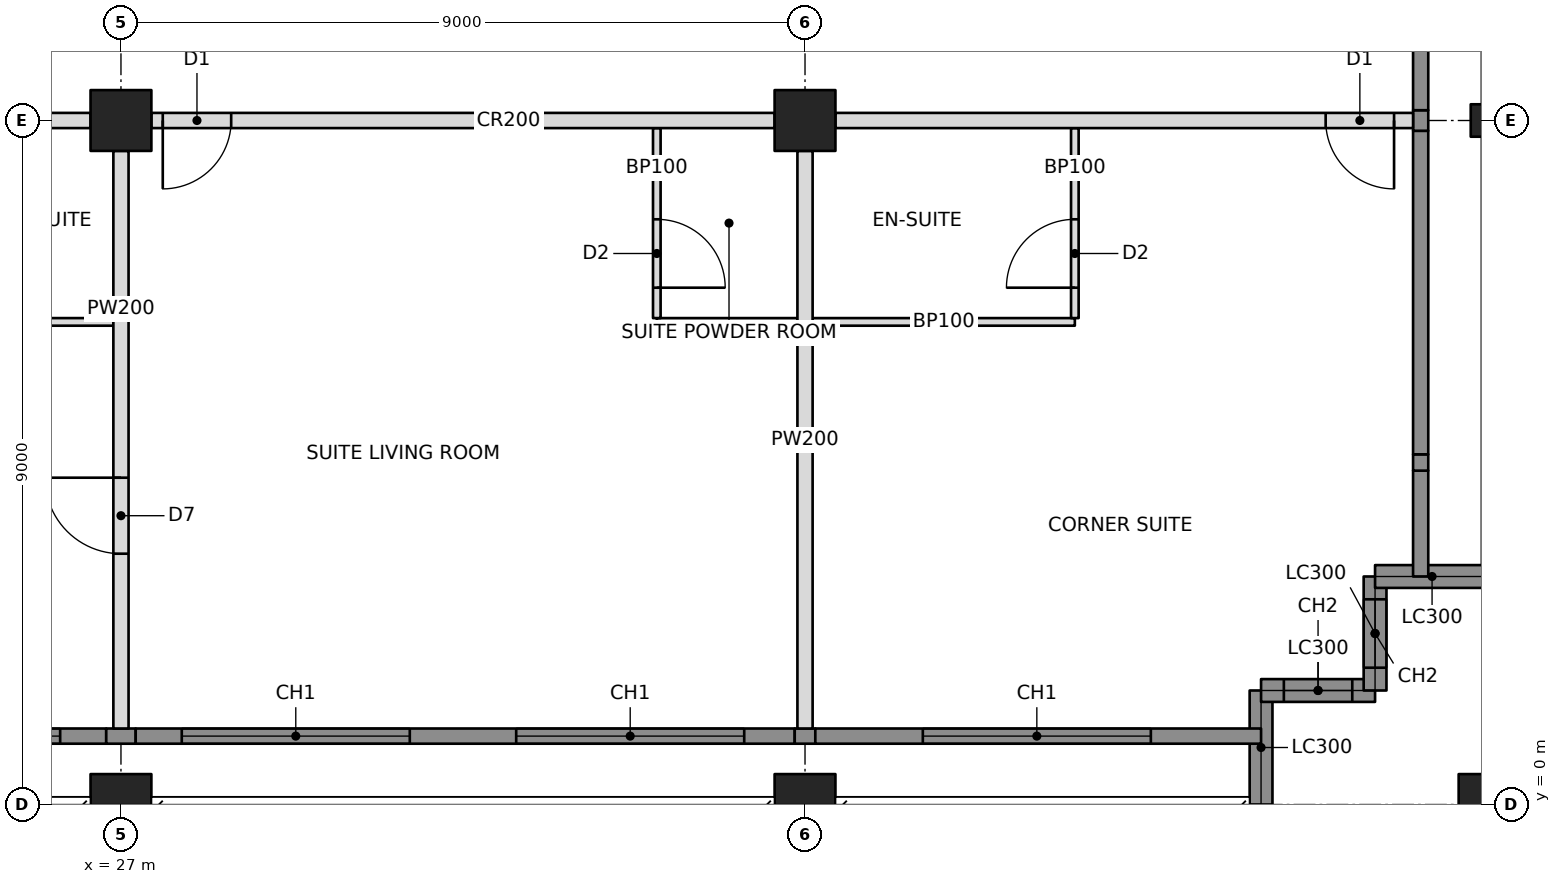
"""IFC4 building model, lengths in metres.
Left out: names, types, materials, properties, quantities, classifications, styles, units other than length and angle.
Written with IfcOpenShell. Run it as: python <this file> out.ifc"""

import sys

from ifc_helpers import new_model, si_unit, direction, frame, frame_2d, origin, origin_2d, place, context, subcontext, project, spatial, rectangle, hollow_rectangle, i_section, extrude, element, fill, save


model = new_model("IFC4")
c1 = context("Model", 3, precision=1e-05, world=origin(), true_north=direction((0.0, 1.0)))
c2 = subcontext(c1, "Body", "Model", "MODEL_VIEW")
j1 = project(units=[si_unit("LENGTHUNIT", "METRE"), si_unit("PLANEANGLEUNIT", "RADIAN")], contexts=[c1])
p1 = place(None, origin())
s1 = spatial("IfcSite", under=j1, at=p1, CompositionType="ELEMENT")
p2 = place(p1, origin())
s2 = spatial("IfcBuilding", under=s1, at=p2, CompositionType="ELEMENT")
p3 = place(p2, frame((0.0, 0.0, 214.8)))
s3 = spatial("IfcBuildingStorey", under=s2, at=p3, CompositionType="ELEMENT", Elevation=214.8)
p4 = place(p3, frame((27.0, 0.0, 0.0), z_axis=(0.0, 0.0, 1.0), x_axis=(1.0, 0.0, 0.0)))
e1 = element("IfcColumn", 1, at=p4, inside=s3, PredefinedType="COLUMN", context=c2, shape_type="SweptSolid", body=[
    extrude(hollow_rectangle(XDim=0.8, YDim=0.8, WallThickness=0.06, at=origin_2d()), origin(), (0.0, 0.0, 1.0), 3.4),
])
p5 = place(p3, frame((27.0, 9.0, 0.0), z_axis=(0.0, 0.0, 1.0), x_axis=(1.0, 0.0, 0.0)))
e2 = element("IfcColumn", 2, at=p5, inside=s3, PredefinedType="COLUMN", context=c2, shape_type="SweptSolid", body=[
    extrude(hollow_rectangle(XDim=0.8, YDim=0.8, WallThickness=0.05, at=origin_2d()), origin(), (0.0, 0.0, 1.0), 3.4),
])
p6 = place(p3, frame((36.0, 0.0, 0.0), z_axis=(0.0, 0.0, 1.0), x_axis=(1.0, 0.0, 0.0)))
e3 = element("IfcColumn", 3, at=p6, inside=s3, PredefinedType="COLUMN", context=c2, shape_type="SweptSolid", body=[
    extrude(hollow_rectangle(XDim=0.8, YDim=0.8, WallThickness=0.06, at=origin_2d()), origin(), (0.0, 0.0, 1.0), 3.4),
])
p7 = place(p3, frame((36.0, 9.0, 0.0), z_axis=(0.0, 0.0, 1.0), x_axis=(0.0, 1.0, 0.0)))
e4 = element("IfcColumn", 4, at=p7, inside=s3, PredefinedType="COLUMN", context=c2, shape_type="SweptSolid", body=[
    extrude(hollow_rectangle(XDim=0.8, YDim=0.8, WallThickness=0.05, at=origin_2d()), origin(), (0.0, 0.0, 1.0), 3.4),
])
p8 = place(p3, frame((45.0, 0.0, 0.0), z_axis=(0.0, 0.0, 1.0), x_axis=(1.0, 0.0, 0.0)))
e5 = element("IfcColumn", 5, at=p8, inside=s3, PredefinedType="COLUMN", context=c2, shape_type="SweptSolid", body=[
    extrude(hollow_rectangle(XDim=0.8, YDim=0.8, WallThickness=0.06, at=origin_2d()), origin(), (0.0, 0.0, 1.0), 3.4),
])
p9 = place(p3, frame((45.0, 9.0, 0.0), z_axis=(0.0, 0.0, 1.0), x_axis=(0.0, 1.0, 0.0)))
e6 = element("IfcColumn", 6, at=p9, inside=s3, PredefinedType="COLUMN", context=c2, shape_type="SweptSolid", body=[
    extrude(i_section(OverallWidth=0.427, OverallDepth=0.483, WebThickness=0.051, FlangeThickness=0.082, at=origin_2d()), origin(), (0.0, 0.0, 1.0), 3.4),
])
p10 = place(p3, frame((42.0, 0.0, 0.0), z_axis=(0.0, 0.0, 1.0), x_axis=(0.0, 1.0, 0.0)))
e7 = element("IfcWall", 7, at=p10, inside=s3, PredefinedType="SOLIDWALL", context=c2, shape_type="SweptSolid", body=[
    extrude(rectangle(XDim=1.5, YDim=0.3, at=frame_2d((0.75, 0.0))), origin(), (0.0, 0.0, 1.0), 2.42),
])
p11 = place(p3, frame((42.0, 1.5, 0.0), z_axis=(0.0, 0.0, 1.0), x_axis=(1.0, 0.0, 0.0)))
e8 = element("IfcWall", 8, at=p11, inside=s3, PredefinedType="SOLIDWALL", context=c2, shape_type="SweptSolid", body=[
    extrude(rectangle(XDim=1.5, YDim=0.3, at=frame_2d((0.75, 0.0))), origin(), (0.0, 0.0, 1.0), 3.2),
])
p12 = place(p11, frame((0.3, 0.0, 0.6)))
e9 = element("IfcOpeningElement", 9, at=p12, cuts=e8, PredefinedType="OPENING", context=c2, shape_type="SweptSolid", body=[
    extrude(rectangle(XDim=0.9, YDim=2.2, at=frame_2d((0.45, 1.1))), frame((0.0, 0.16, 0.0), z_axis=(0.0, -1.0, 0.0), x_axis=(1.0, 0.0, 0.0)), (0.0, 0.0, 1.0), 0.32),
])
p13 = place(p3, frame((43.5, 1.5, 0.0), z_axis=(0.0, 0.0, 1.0), x_axis=(0.0, 1.0, 0.0)))
e10 = element("IfcWall", 10, at=p13, inside=s3, PredefinedType="SOLIDWALL", context=c2, shape_type="SweptSolid", body=[
    extrude(rectangle(XDim=1.5, YDim=0.3, at=frame_2d((0.75, 0.0))), origin(), (0.0, 0.0, 1.0), 3.2),
])
p14 = place(p13, frame((0.3, 0.0, 0.6)))
e11 = element("IfcOpeningElement", 11, at=p14, cuts=e10, PredefinedType="OPENING", context=c2, shape_type="SweptSolid", body=[
    extrude(rectangle(XDim=0.9, YDim=2.2, at=frame_2d((0.45, 1.1))), frame((0.0, 0.16, 0.0), z_axis=(0.0, -1.0, 0.0), x_axis=(1.0, 0.0, 0.0)), (0.0, 0.0, 1.0), 0.32),
])
p15 = place(p3, frame((43.5, 3.0, 0.0), z_axis=(0.0, 0.0, 1.0), x_axis=(1.0, 0.0, 0.0)))
e12 = element("IfcWall", 12, at=p15, inside=s3, PredefinedType="SOLIDWALL", context=c2, shape_type="SweptSolid", body=[
    extrude(rectangle(XDim=1.5, YDim=0.3, at=frame_2d((0.75, 0.0))), origin(), (0.0, 0.0, 1.0), 2.42),
])
p16 = place(p3, frame((44.1, 3.0, 0.0), z_axis=(0.0, 0.0, 1.0), x_axis=(0.0, 1.0, 0.0)))
e13 = element("IfcWall", 13, at=p16, inside=s3, PredefinedType="SOLIDWALL", context=c2, shape_type="SweptSolid", body=[
    extrude(rectangle(XDim=1.393, YDim=0.2, at=frame_2d((0.696, 0.0))), origin(), (0.0, 0.0, 1.0), 3.2),
])
p17 = place(p3, frame((18.4, 9.0, 0.0), z_axis=(0.0, 0.0, 1.0), x_axis=(1.0, 0.0, 0.0)))
e14 = element("IfcWall", 14, at=p17, inside=s3, PredefinedType="PARTITIONING", context=c2, shape_type="SweptSolid", body=[
    extrude(rectangle(XDim=8.2, YDim=0.2, at=frame_2d((4.1, 0.0))), origin(), (0.0, 0.0, 1.0), 2.405),
])
p18 = place(p17, frame((2.95, 0.0, 0.0)))
e15 = element("IfcOpeningElement", 15, at=p18, cuts=e14, PredefinedType="OPENING", context=c2, shape_type="SweptSolid", body=[
    extrude(rectangle(XDim=0.9, YDim=2.1, at=frame_2d((0.45, 1.05))), frame((0.0, 0.11, 0.0), z_axis=(0.0, -1.0, 0.0), x_axis=(1.0, 0.0, 0.0)), (0.0, 0.0, 1.0), 0.22),
])
p19 = place(p17, frame((4.35, 0.0, 0.0)))
e16 = element("IfcOpeningElement", 16, at=p19, cuts=e14, PredefinedType="OPENING", context=c2, shape_type="SweptSolid", body=[
    extrude(rectangle(XDim=0.9, YDim=2.1, at=frame_2d((0.45, 1.05))), frame((0.0, 0.11, 0.0), z_axis=(0.0, -1.0, 0.0), x_axis=(1.0, 0.0, 0.0)), (0.0, 0.0, 1.0), 0.22),
])
p20 = place(p3, frame((27.4, 9.0, 0.0), z_axis=(0.0, 0.0, 1.0), x_axis=(1.0, 0.0, 0.0)))
e17 = element("IfcWall", 17, at=p20, inside=s3, PredefinedType="PARTITIONING", context=c2, shape_type="SweptSolid", body=[
    extrude(rectangle(XDim=8.2, YDim=0.2, at=frame_2d((4.1, 0.0))), origin(), (0.0, 0.0, 1.0), 2.405),
])
p21 = place(p20, frame((0.15, 0.0, 0.0)))
e18 = element("IfcOpeningElement", 18, at=p21, cuts=e17, PredefinedType="OPENING", context=c2, shape_type="SweptSolid", body=[
    extrude(rectangle(XDim=0.9, YDim=2.1, at=frame_2d((0.45, 1.05))), frame((0.0, 0.11, 0.0), z_axis=(0.0, -1.0, 0.0), x_axis=(1.0, 0.0, 0.0)), (0.0, 0.0, 1.0), 0.22),
])
p22 = place(p3, frame((36.4, 9.0, 0.0), z_axis=(0.0, 0.0, 1.0), x_axis=(1.0, 0.0, 0.0)))
e19 = element("IfcWall", 19, at=p22, inside=s3, PredefinedType="PARTITIONING", context=c2, shape_type="SweptSolid", body=[
    extrude(rectangle(XDim=7.6, YDim=0.2, at=frame_2d((3.8, 0.0))), origin(), (0.0, 0.0, 1.0), 2.438),
])
p23 = place(p22, frame((6.45, 0.0, 0.0)))
e20 = element("IfcOpeningElement", 20, at=p23, cuts=e19, PredefinedType="OPENING", context=c2, shape_type="SweptSolid", body=[
    extrude(rectangle(XDim=0.9, YDim=2.1, at=frame_2d((0.45, 1.05))), frame((0.0, 0.11, 0.0), z_axis=(0.0, -1.0, 0.0), x_axis=(1.0, 0.0, 0.0)), (0.0, 0.0, 1.0), 0.22),
])
p24 = place(p3, frame((27.0, 8.6, 0.0), z_axis=(0.0, 0.0, 1.0), x_axis=(0.0, -1.0, 0.0)))
e21 = element("IfcWall", 21, at=p24, inside=s3, PredefinedType="PARTITIONING", context=c2, shape_type="SweptSolid", body=[
    extrude(rectangle(XDim=7.6, YDim=0.2, at=frame_2d((3.8, 0.0))), origin(), (0.0, 0.0, 1.0), 2.405),
])
p25 = place(p24, frame((4.3, 0.0, 0.0)))
e22 = element("IfcOpeningElement", 22, at=p25, cuts=e21, PredefinedType="OPENING", context=c2, shape_type="SweptSolid", body=[
    extrude(rectangle(XDim=1.0, YDim=2.1, at=frame_2d((0.5, 1.05))), frame((0.0, 0.11, 0.0), z_axis=(0.0, -1.0, 0.0), x_axis=(1.0, 0.0, 0.0)), (0.0, 0.0, 1.0), 0.22),
])
p26 = place(p3, frame((36.0, 8.6, 0.0), z_axis=(0.0, 0.0, 1.0), x_axis=(0.0, -1.0, 0.0)))
e23 = element("IfcWall", 23, at=p26, inside=s3, PredefinedType="PARTITIONING", context=c2, shape_type="SweptSolid", body=[
    extrude(rectangle(XDim=7.6, YDim=0.2, at=frame_2d((3.8, 0.0))), origin(), (0.0, 0.0, 1.0), 2.438),
])
p27 = place(p3, frame((23.95, 6.35, 0.0), z_axis=(0.0, 0.0, 1.0), x_axis=(1.0, 0.0, 0.0)))
e24 = element("IfcWall", 24, at=p27, inside=s3, PredefinedType="PARTITIONING", context=c2, shape_type="SweptSolid", body=[
    extrude(rectangle(XDim=2.95, YDim=0.1, at=frame_2d((1.475, 0.0))), origin(), (0.0, 0.0, 1.0), 2.404),
])
p28 = place(p3, frame((34.05, 6.35, 0.0), z_axis=(0.0, 0.0, 1.0), x_axis=(1.0, 0.0, 0.0)))
e25 = element("IfcWall", 25, at=p28, inside=s3, PredefinedType="PARTITIONING", context=c2, shape_type="SweptSolid", body=[
    extrude(rectangle(XDim=1.85, YDim=0.1, at=frame_2d((0.925, 0.0))), origin(), (0.0, 0.0, 1.0), 2.438),
])
p29 = place(p3, frame((34.05, 8.9, 0.0), z_axis=(0.0, 0.0, 1.0), x_axis=(0.0, -1.0, 0.0)))
e26 = element("IfcWall", 26, at=p29, inside=s3, PredefinedType="PARTITIONING", context=c2, shape_type="SweptSolid", body=[
    extrude(rectangle(XDim=2.5, YDim=0.1, at=frame_2d((1.25, 0.0))), origin(), (0.0, 0.0, 1.0), 2.404),
])
p30 = place(p29, frame((1.2, 0.0, 0.0)))
e27 = element("IfcOpeningElement", 27, at=p30, cuts=e26, PredefinedType="OPENING", context=c2, shape_type="SweptSolid", body=[
    extrude(rectangle(XDim=0.9, YDim=2.1, at=frame_2d((0.45, 1.05))), frame((0.0, 0.06, 0.0), z_axis=(0.0, -1.0, 0.0), x_axis=(1.0, 0.0, 0.0)), (0.0, 0.0, 1.0), 0.12),
])
p31 = place(p3, frame((36.1, 6.35, 0.0), z_axis=(0.0, 0.0, 1.0), x_axis=(1.0, 0.0, 0.0)))
e28 = element("IfcWall", 28, at=p31, inside=s3, PredefinedType="PARTITIONING", context=c2, shape_type="SweptSolid", body=[
    extrude(rectangle(XDim=3.45, YDim=0.1, at=frame_2d((1.725, 0.0))), origin(), (0.0, 0.0, 1.0), 2.438),
])
p32 = place(p3, frame((39.55, 8.9, 0.0), z_axis=(0.0, 0.0, 1.0), x_axis=(0.0, -1.0, 0.0)))
e29 = element("IfcWall", 29, at=p32, inside=s3, PredefinedType="PARTITIONING", context=c2, shape_type="SweptSolid", body=[
    extrude(rectangle(XDim=2.5, YDim=0.1, at=frame_2d((1.25, 0.0))), origin(), (0.0, 0.0, 1.0), 2.438),
])
p33 = place(p32, frame((1.2, 0.0, 0.0)))
e30 = element("IfcOpeningElement", 30, at=p33, cuts=e29, PredefinedType="OPENING", context=c2, shape_type="SweptSolid", body=[
    extrude(rectangle(XDim=0.9, YDim=2.1, at=frame_2d((0.45, 1.05))), frame((0.0, 0.06, 0.0), z_axis=(0.0, -1.0, 0.0), x_axis=(1.0, 0.0, 0.0)), (0.0, 0.0, 1.0), 0.12),
])
p34 = place(p3, frame((18.194, 0.9, 0.0), z_axis=(0.0, 0.0, 1.0), x_axis=(1.0, 0.0, 0.0)))
e31 = element("IfcWall", 31, at=p34, inside=s3, PredefinedType="SOLIDWALL", context=c2, shape_type="SweptSolid", body=[
    extrude(rectangle(XDim=8.612, YDim=0.2, at=frame_2d((4.306, 0.0))), origin(), (0.0, 0.0, 1.0), 3.2),
])
p35 = place(p34, frame((0.606, 0.0, 0.6)))
e32 = element("IfcOpeningElement", 32, at=p35, cuts=e31, PredefinedType="OPENING", context=c2, shape_type="SweptSolid", body=[
    extrude(rectangle(XDim=3.0, YDim=2.2, at=frame_2d((1.5, 1.1))), frame((0.0, 0.11, 0.0), z_axis=(0.0, -1.0, 0.0), x_axis=(1.0, 0.0, 0.0)), (0.0, 0.0, 1.0), 0.22),
])
p36 = place(p34, frame((5.006, 0.0, 0.6)))
e33 = element("IfcOpeningElement", 33, at=p36, cuts=e31, PredefinedType="OPENING", context=c2, shape_type="SweptSolid", body=[
    extrude(rectangle(XDim=3.0, YDim=2.2, at=frame_2d((1.5, 1.1))), frame((0.0, 0.11, 0.0), z_axis=(0.0, -1.0, 0.0), x_axis=(1.0, 0.0, 0.0)), (0.0, 0.0, 1.0), 0.22),
])
p37 = place(p3, frame((26.806, 0.9, 0.0), z_axis=(0.0, 0.0, 1.0), x_axis=(1.0, 0.0, 0.0)))
e34 = element("IfcWall", 34, at=p37, inside=s3, PredefinedType="SOLIDWALL", context=c2, shape_type="SweptSolid", body=[
    extrude(rectangle(XDim=0.388, YDim=0.2, at=frame_2d((0.194, 0.0))), origin(), (0.0, 0.0, 1.0), 2.404),
])
p38 = place(p3, frame((27.194, 0.9, 0.0), z_axis=(0.0, 0.0, 1.0), x_axis=(1.0, 0.0, 0.0)))
e35 = element("IfcWall", 35, at=p38, inside=s3, PredefinedType="SOLIDWALL", context=c2, shape_type="SweptSolid", body=[
    extrude(rectangle(XDim=8.671, YDim=0.2, at=frame_2d((4.335, 0.0))), origin(), (0.0, 0.0, 1.0), 3.2),
])
p39 = place(p38, frame((0.606, 0.0, 0.6)))
e36 = element("IfcOpeningElement", 36, at=p39, cuts=e35, PredefinedType="OPENING", context=c2, shape_type="SweptSolid", body=[
    extrude(rectangle(XDim=3.0, YDim=2.2, at=frame_2d((1.5, 1.1))), frame((0.0, 0.11, 0.0), z_axis=(0.0, -1.0, 0.0), x_axis=(1.0, 0.0, 0.0)), (0.0, 0.0, 1.0), 0.22),
])
p40 = place(p38, frame((5.006, 0.0, 0.6)))
e37 = element("IfcOpeningElement", 37, at=p40, cuts=e35, PredefinedType="OPENING", context=c2, shape_type="SweptSolid", body=[
    extrude(rectangle(XDim=3.0, YDim=2.2, at=frame_2d((1.5, 1.1))), frame((0.0, 0.11, 0.0), z_axis=(0.0, -1.0, 0.0), x_axis=(1.0, 0.0, 0.0)), (0.0, 0.0, 1.0), 0.22),
])
p41 = place(p3, frame((35.865, 0.9, 0.0), z_axis=(0.0, 0.0, 1.0), x_axis=(1.0, 0.0, 0.0)))
e38 = element("IfcWall", 38, at=p41, inside=s3, PredefinedType="SOLIDWALL", context=c2, shape_type="SweptSolid", body=[
    extrude(rectangle(XDim=0.271, YDim=0.2, at=frame_2d((0.135, 0.0))), origin(), (0.0, 0.0, 1.0), 2.438),
])
p42 = place(p3, frame((36.135, 0.9, 0.0), z_axis=(0.0, 0.0, 1.0), x_axis=(1.0, 0.0, 0.0)))
e39 = element("IfcWall", 39, at=p42, inside=s3, PredefinedType="SOLIDWALL", context=c2, shape_type="SweptSolid", body=[
    extrude(rectangle(XDim=5.865, YDim=0.2, at=frame_2d((2.932, 0.0))), origin(), (0.0, 0.0, 1.0), 3.2),
])
p43 = place(p42, frame((1.415, 0.0, 0.6)))
e40 = element("IfcOpeningElement", 40, at=p43, cuts=e39, PredefinedType="OPENING", context=c2, shape_type="SweptSolid", body=[
    extrude(rectangle(XDim=3.0, YDim=2.2, at=frame_2d((1.5, 1.1))), frame((0.0, 0.11, 0.0), z_axis=(0.0, -1.0, 0.0), x_axis=(1.0, 0.0, 0.0)), (0.0, 0.0, 1.0), 0.22),
])
p44 = place(p3, frame((44.1, 4.393, 0.0), z_axis=(0.0, 0.0, 1.0), x_axis=(0.0, 1.0, 0.0)))
e41 = element("IfcWall", 41, at=p44, inside=s3, PredefinedType="SOLIDWALL", context=c2, shape_type="SweptSolid", body=[
    extrude(rectangle(XDim=0.215, YDim=0.2, at=frame_2d((0.107, 0.0))), origin(), (0.0, 0.0, 1.0), 2.661),
])
p45 = place(p3, frame((44.1, 4.607, 0.0), z_axis=(0.0, 0.0, 1.0), x_axis=(0.0, 1.0, 0.0)))
e42 = element("IfcWall", 42, at=p45, inside=s3, PredefinedType="SOLIDWALL", context=c2, shape_type="SweptSolid", body=[
    extrude(rectangle(XDim=4.257, YDim=0.2, at=frame_2d((2.129, 0.0))), origin(), (0.0, 0.0, 1.0), 3.2),
])
p46 = place(p3, frame((44.1, 8.865, 0.0), z_axis=(0.0, 0.0, 1.0), x_axis=(0.0, 1.0, 0.0)))
e43 = element("IfcWall", 43, at=p46, inside=s3, PredefinedType="SOLIDWALL", context=c2, shape_type="SweptSolid", body=[
    extrude(rectangle(XDim=0.271, YDim=0.2, at=frame_2d((0.135, 0.0))), origin(), (0.0, 0.0, 1.0), 2.438),
])
p47 = place(p3, frame((44.1, 9.135, 0.0), z_axis=(0.0, 0.0, 1.0), x_axis=(0.0, 1.0, 0.0)))
e44 = element("IfcWall", 44, at=p47, inside=s3, PredefinedType="SOLIDWALL", context=c2, shape_type="SweptSolid", body=[
    extrude(rectangle(XDim=8.671, YDim=0.2, at=frame_2d((4.335, 0.0))), origin(), (0.0, 0.0, 1.0), 3.2),
])
p48 = place(p47, frame((2.015, 0.0, 0.6)))
e45 = element("IfcOpeningElement", 45, at=p48, cuts=e44, PredefinedType="OPENING", context=c2, shape_type="SweptSolid", body=[
    extrude(rectangle(XDim=3.0, YDim=2.2, at=frame_2d((1.5, 1.1))), frame((0.0, 0.11, 0.0), z_axis=(0.0, -1.0, 0.0), x_axis=(1.0, 0.0, 0.0)), (0.0, 0.0, 1.0), 0.22),
])
p49 = place(p47, frame((5.515, 0.0, 0.6)))
e46 = element("IfcOpeningElement", 46, at=p49, cuts=e44, PredefinedType="OPENING", context=c2, shape_type="SweptSolid", body=[
    extrude(rectangle(XDim=3.0, YDim=2.2, at=frame_2d((1.5, 1.1))), frame((0.0, 0.11, 0.0), z_axis=(0.0, -1.0, 0.0), x_axis=(1.0, 0.0, 0.0)), (0.0, 0.0, 1.0), 0.22),
])
p50 = place(p12, origin())
e47 = element("IfcWindow", 47, at=p50, inside=s3, PartitioningType="SINGLE_PANEL", PredefinedType="WINDOW", context=c2, shape_type="SweptSolid", body=[
    extrude(rectangle(XDim=0.9, YDim=2.2, at=frame_2d((0.45, 1.1))), frame((0.0, 0.03, 0.0), z_axis=(0.0, -1.0, 0.0), x_axis=(1.0, 0.0, 0.0)), (0.0, 0.0, 1.0), 0.06),
])
fill(e9, e47)
p51 = place(p14, origin())
e48 = element("IfcWindow", 48, at=p51, inside=s3, PartitioningType="SINGLE_PANEL", PredefinedType="WINDOW", context=c2, shape_type="SweptSolid", body=[
    extrude(rectangle(XDim=0.9, YDim=2.2, at=frame_2d((0.45, 1.1))), frame((0.0, 0.03, 0.0), z_axis=(0.0, -1.0, 0.0), x_axis=(1.0, 0.0, 0.0)), (0.0, 0.0, 1.0), 0.06),
])
fill(e11, e48)
p52 = place(p36, origin())
e49 = element("IfcWindow", 49, at=p52, inside=s3, PartitioningType="TRIPLE_PANEL_VERTICAL", PredefinedType="WINDOW", context=c2, shape_type="SweptSolid", body=[
    extrude(rectangle(XDim=3.0, YDim=2.2, at=frame_2d((1.5, 1.1))), frame((0.0, 0.03, 0.0), z_axis=(0.0, -1.0, 0.0), x_axis=(1.0, 0.0, 0.0)), (0.0, 0.0, 1.0), 0.06),
])
fill(e33, e49)
p53 = place(p39, origin())
e50 = element("IfcWindow", 50, at=p53, inside=s3, PartitioningType="TRIPLE_PANEL_VERTICAL", PredefinedType="WINDOW", context=c2, shape_type="SweptSolid", body=[
    extrude(rectangle(XDim=3.0, YDim=2.2, at=frame_2d((1.5, 1.1))), frame((0.0, 0.03, 0.0), z_axis=(0.0, -1.0, 0.0), x_axis=(1.0, 0.0, 0.0)), (0.0, 0.0, 1.0), 0.06),
])
fill(e36, e50)
p54 = place(p40, origin())
e51 = element("IfcWindow", 51, at=p54, inside=s3, PartitioningType="TRIPLE_PANEL_VERTICAL", PredefinedType="WINDOW", context=c2, shape_type="SweptSolid", body=[
    extrude(rectangle(XDim=3.0, YDim=2.2, at=frame_2d((1.5, 1.1))), frame((0.0, 0.03, 0.0), z_axis=(0.0, -1.0, 0.0), x_axis=(1.0, 0.0, 0.0)), (0.0, 0.0, 1.0), 0.06),
])
fill(e37, e51)
p55 = place(p43, origin())
e52 = element("IfcWindow", 52, at=p55, inside=s3, PartitioningType="TRIPLE_PANEL_VERTICAL", PredefinedType="WINDOW", context=c2, shape_type="SweptSolid", body=[
    extrude(rectangle(XDim=3.0, YDim=2.2, at=frame_2d((1.5, 1.1))), frame((0.0, 0.03, 0.0), z_axis=(0.0, -1.0, 0.0), x_axis=(1.0, 0.0, 0.0)), (0.0, 0.0, 1.0), 0.06),
])
fill(e40, e52)
p56 = place(p25, frame((1.0, 0.0, 0.0), z_axis=(0.0, 0.0, 1.0), x_axis=(-1.0, 0.0, 0.0)))
e53 = element("IfcDoor", 53, at=p56, inside=s3, OperationType="SINGLE_SWING_RIGHT", PredefinedType="DOOR", context=c2, shape_type="SweptSolid", body=[
    extrude(rectangle(XDim=1.0, YDim=2.1, at=frame_2d((0.5, 1.05))), frame((0.0, 0.025, 0.0), z_axis=(0.0, -1.0, 0.0), x_axis=(1.0, 0.0, 0.0)), (0.0, 0.0, 1.0), 0.05),
])
fill(e22, e53)
p57 = place(p30, origin())
e54 = element("IfcDoor", 54, at=p57, inside=s3, OperationType="SINGLE_SWING_RIGHT", PredefinedType="DOOR", context=c2, shape_type="SweptSolid", body=[
    extrude(rectangle(XDim=0.9, YDim=2.1, at=frame_2d((0.45, 1.05))), frame((0.0, 0.025, 0.0), z_axis=(0.0, -1.0, 0.0), x_axis=(1.0, 0.0, 0.0)), (0.0, 0.0, 1.0), 0.05),
])
fill(e27, e54)
p58 = place(p21, frame((0.9, 0.0, 0.0), z_axis=(0.0, 0.0, 1.0), x_axis=(-1.0, 0.0, 0.0)))
e55 = element("IfcDoor", 55, at=p58, inside=s3, OperationType="SINGLE_SWING_RIGHT", PredefinedType="DOOR", context=c2, shape_type="SweptSolid", body=[
    extrude(rectangle(XDim=0.9, YDim=2.1, at=frame_2d((0.45, 1.05))), frame((0.0, 0.025, 0.0), z_axis=(0.0, -1.0, 0.0), x_axis=(1.0, 0.0, 0.0)), (0.0, 0.0, 1.0), 0.05),
])
fill(e18, e55)
p59 = place(p33, frame((0.9, 0.0, 0.0), z_axis=(0.0, 0.0, 1.0), x_axis=(-1.0, 0.0, 0.0)))
e56 = element("IfcDoor", 56, at=p59, inside=s3, OperationType="SINGLE_SWING_LEFT", PredefinedType="DOOR", context=c2, shape_type="SweptSolid", body=[
    extrude(rectangle(XDim=0.9, YDim=2.1, at=frame_2d((0.45, 1.05))), frame((0.0, 0.025, 0.0), z_axis=(0.0, -1.0, 0.0), x_axis=(1.0, 0.0, 0.0)), (0.0, 0.0, 1.0), 0.05),
])
fill(e30, e56)
p60 = place(p23, frame((0.9, 0.0, 0.0), z_axis=(0.0, 0.0, 1.0), x_axis=(-1.0, 0.0, 0.0)))
e57 = element("IfcDoor", 57, at=p60, inside=s3, OperationType="SINGLE_SWING_LEFT", PredefinedType="DOOR", context=c2, shape_type="SweptSolid", body=[
    extrude(rectangle(XDim=0.9, YDim=2.1, at=frame_2d((0.45, 1.05))), frame((0.0, 0.025, 0.0), z_axis=(0.0, -1.0, 0.0), x_axis=(1.0, 0.0, 0.0)), (0.0, 0.0, 1.0), 0.05),
])
fill(e20, e57)
save(model, sys.argv[1])
